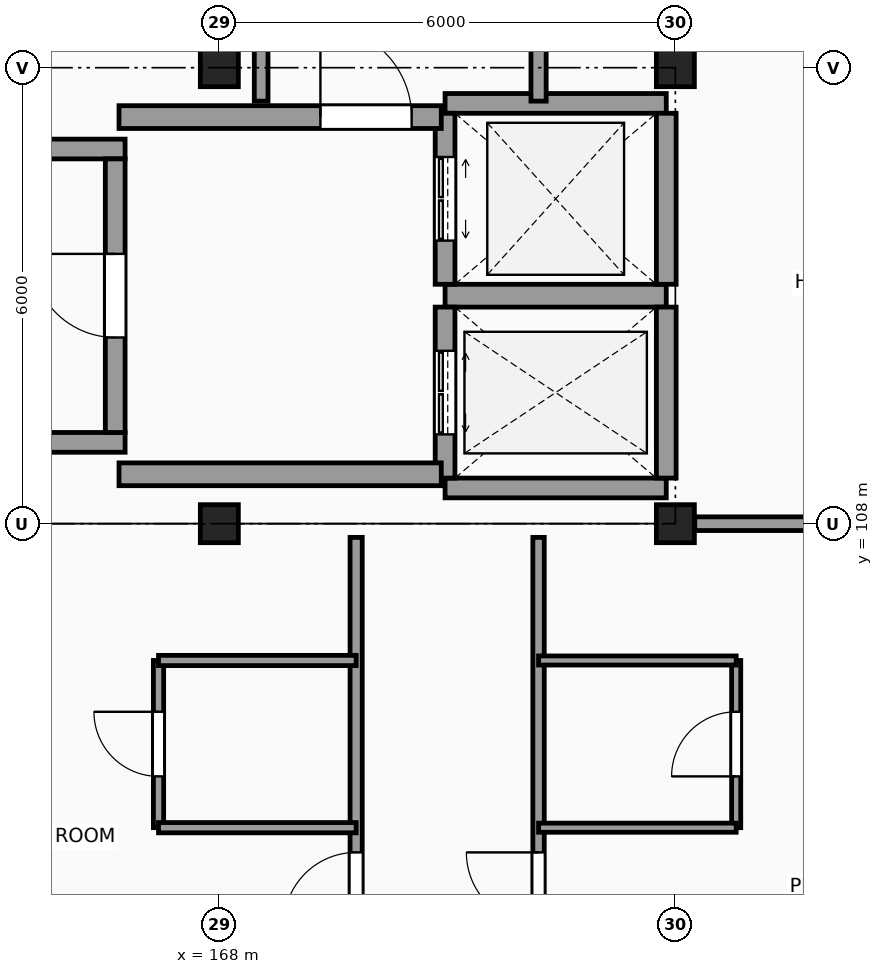
"""IFC4 building model, lengths in metres.
Left out: names, types, materials, properties, quantities, classifications, styles, units other than length and angle.
Written with IfcOpenShell. Run it as: python <this file> out.ifc"""

import sys

from ifc_helpers import new_model, si_unit, direction, frame, frame_2d, origin, origin_2d, place, context, subcontext, project, spatial, rectangle, extrude, element, fill, save


model = new_model("IFC4")
c1 = context("Model", 3, precision=1e-05, world=origin(), true_north=direction((0.0, 1.0)))
c2 = subcontext(c1, "Body", "Model", "MODEL_VIEW")
j1 = project(units=[si_unit("LENGTHUNIT", "METRE"), si_unit("PLANEANGLEUNIT", "RADIAN")], contexts=[c1])
p1 = place(None, origin())
s1 = spatial("IfcSite", under=j1, at=p1, CompositionType="ELEMENT")
p2 = place(p1, origin())
s2 = spatial("IfcBuilding", under=s1, at=p2, CompositionType="ELEMENT")
p3 = place(p2, frame((0.0, 0.0, 38.1)))
s3 = spatial("IfcBuildingStorey", under=s2, at=p3, CompositionType="ELEMENT", Elevation=38.1)
for number, where, z_axis, x_axis in (
    (1, (168.0, 108.0, 0.0), (0.0, 0.0, 1.0), (1.0, 0.0, 0.0)),
    (2, (168.0, 114.0, 0.0), (0.0, 0.0, 1.0), (1.0, 0.0, 0.0)),
    (3, (174.0, 108.0, 0.0), (0.0, 0.0, 1.0), (1.0, 0.0, 0.0)),
    (4, (174.0, 114.0, 0.0), (0.0, 0.0, 1.0), (1.0, 0.0, 0.0)),
):
    element("IfcColumn", number, at=place(p3, frame(where, z_axis=z_axis, x_axis=x_axis)), inside=s3, PredefinedType="COLUMN", context=c2, shape_type="SweptSolid", body=[
        extrude(rectangle(XDim=0.5, YDim=0.5, at=origin_2d()), origin(), (0.0, 0.0, 1.0), 3.3),
    ])
for number, where, z_axis, x_axis in (
    (5, (156.04, 109.07, 0.0), (0.0, 0.0, 1.0), (1.0, 0.0, 0.0)),
    (6, (156.04, 112.93, 0.0), (0.0, 0.0, 1.0), (1.0, 0.0, 0.0)),
):
    element("IfcWall", number, at=place(p3, frame(where, z_axis=z_axis, x_axis=x_axis)), inside=s3, PredefinedType="SHEAR", context=c2, shape_type="SweptSolid", body=[
        extrude(rectangle(XDim=10.72, YDim=0.26, at=frame_2d((5.36, 0.0))), origin(), (0.0, 0.0, 1.0), 3.3),
    ])
p4 = place(p3, frame((166.63, 109.2, 0.0), z_axis=(0.0, 0.0, 1.0), x_axis=(0.0, 1.0, 0.0)))
e7 = element("IfcWall", 7, at=p4, inside=s3, PredefinedType="SHEAR", context=c2, shape_type="SweptSolid", body=[
    extrude(rectangle(XDim=3.6, YDim=0.26, at=frame_2d((1.8, 0.0))), origin(), (0.0, 0.0, 1.0), 3.3),
])
p5 = place(p4, frame((1.25, 0.0, 0.0)))
e8 = element("IfcOpeningElement", 8, at=p5, cuts=e7, PredefinedType="OPENING", context=c2, shape_type="SweptSolid", body=[
    extrude(rectangle(XDim=1.1, YDim=2.15, at=frame_2d((0.55, 1.075))), frame((0.0, 0.14, 0.0), z_axis=(0.0, -1.0, 0.0), x_axis=(1.0, 0.0, 0.0)), (0.0, 0.0, 1.0), 0.28),
])
p6 = place(p3, frame((170.97, 108.47, 0.0), z_axis=(0.0, 0.0, 1.0), x_axis=(1.0, 0.0, 0.0)))
e9 = element("IfcWall", 9, at=p6, inside=s3, PredefinedType="SHEAR", context=c2, shape_type="SweptSolid", body=[
    extrude(rectangle(XDim=2.91, YDim=0.26, at=frame_2d((1.455, 0.0))), origin(), (0.0, 0.0, 1.0), 3.3),
])
p7 = place(p3, frame((170.97, 111.0, 0.0), z_axis=(0.0, 0.0, 1.0), x_axis=(1.0, 0.0, 0.0)))
e10 = element("IfcWall", 10, at=p7, inside=s3, PredefinedType="SHEAR", context=c2, shape_type="SweptSolid", body=[
    extrude(rectangle(XDim=2.91, YDim=0.3, at=frame_2d((1.455, 0.0))), origin(), (0.0, 0.0, 1.0), 3.3),
])
p8 = place(p3, frame((173.88, 108.6, 0.0), z_axis=(0.0, 0.0, 1.0), x_axis=(0.0, 1.0, 0.0)))
e11 = element("IfcWall", 11, at=p8, inside=s3, PredefinedType="SHEAR", context=c2, shape_type="SweptSolid", body=[
    extrude(rectangle(XDim=2.25, YDim=0.26, at=frame_2d((1.125, 0.0))), origin(), (0.0, 0.0, 1.0), 3.3),
])
p9 = place(p3, frame((170.97, 108.6, 0.0), z_axis=(0.0, 0.0, 1.0), x_axis=(0.0, 1.0, 0.0)))
e12 = element("IfcWall", 12, at=p9, inside=s3, PredefinedType="SHEAR", context=c2, shape_type="SweptSolid", body=[
    extrude(rectangle(XDim=2.25, YDim=0.26, at=frame_2d((1.125, 0.0))), origin(), (0.0, 0.0, 1.0), 3.3),
])
p10 = place(p9, frame((0.575, 0.0, 0.0)))
e13 = element("IfcOpeningElement", 13, at=p10, cuts=e12, PredefinedType="OPENING", context=c2, shape_type="SweptSolid", body=[
    extrude(rectangle(XDim=1.1, YDim=2.2, at=frame_2d((0.55, 1.1))), frame((0.0, 0.14, 0.0), z_axis=(0.0, -1.0, 0.0), x_axis=(1.0, 0.0, 0.0)), (0.0, 0.0, 1.0), 0.28),
])
p11 = place(p3, frame((170.97, 113.53, 0.0), z_axis=(0.0, 0.0, 1.0), x_axis=(1.0, 0.0, 0.0)))
e14 = element("IfcWall", 14, at=p11, inside=s3, PredefinedType="SHEAR", context=c2, shape_type="SweptSolid", body=[
    extrude(rectangle(XDim=2.91, YDim=0.26, at=frame_2d((1.455, 0.0))), origin(), (0.0, 0.0, 1.0), 3.3),
])
p12 = place(p3, frame((173.88, 111.15, 0.0), z_axis=(0.0, 0.0, 1.0), x_axis=(0.0, 1.0, 0.0)))
e15 = element("IfcWall", 15, at=p12, inside=s3, PredefinedType="SHEAR", context=c2, shape_type="SweptSolid", body=[
    extrude(rectangle(XDim=2.25, YDim=0.26, at=frame_2d((1.125, 0.0))), origin(), (0.0, 0.0, 1.0), 3.3),
])
p13 = place(p3, frame((170.97, 111.15, 0.0), z_axis=(0.0, 0.0, 1.0), x_axis=(0.0, 1.0, 0.0)))
e16 = element("IfcWall", 16, at=p13, inside=s3, PredefinedType="SHEAR", context=c2, shape_type="SweptSolid", body=[
    extrude(rectangle(XDim=2.25, YDim=0.26, at=frame_2d((1.125, 0.0))), origin(), (0.0, 0.0, 1.0), 3.3),
])
p14 = place(p13, frame((0.575, 0.0, 0.0)))
e17 = element("IfcOpeningElement", 17, at=p14, cuts=e16, PredefinedType="OPENING", context=c2, shape_type="SweptSolid", body=[
    extrude(rectangle(XDim=1.1, YDim=2.2, at=frame_2d((0.55, 1.1))), frame((0.0, 0.14, 0.0), z_axis=(0.0, -1.0, 0.0), x_axis=(1.0, 0.0, 0.0)), (0.0, 0.0, 1.0), 0.28),
])
p15 = place(p3, frame((166.68, 113.35, 0.0), z_axis=(0.0, 0.0, 1.0), x_axis=(1.0, 0.0, 0.0)))
e18 = element("IfcWall", 18, at=p15, inside=s3, PredefinedType="SHEAR", context=c2, shape_type="SweptSolid", body=[
    extrude(rectangle(XDim=4.24, YDim=0.3, at=frame_2d((2.12, 0.0))), origin(), (0.0, 0.0, 1.0), 3.3),
])
p16 = place(p15, frame((2.65, 0.0, 0.0)))
e19 = element("IfcOpeningElement", 19, at=p16, cuts=e18, PredefinedType="OPENING", context=c2, shape_type="SweptSolid", body=[
    extrude(rectangle(XDim=1.2, YDim=2.2, at=frame_2d((0.6, 1.1))), frame((0.0, 0.16, 0.0), z_axis=(0.0, -1.0, 0.0), x_axis=(1.0, 0.0, 0.0)), (0.0, 0.0, 1.0), 0.32),
])
p17 = place(p3, frame((166.68, 108.65, 0.0), z_axis=(0.0, 0.0, 1.0), x_axis=(1.0, 0.0, 0.0)))
e20 = element("IfcWall", 20, at=p17, inside=s3, PredefinedType="SHEAR", context=c2, shape_type="SweptSolid", body=[
    extrude(rectangle(XDim=4.24, YDim=0.3, at=frame_2d((2.12, 0.0))), origin(), (0.0, 0.0, 1.0), 3.3),
])
p18 = place(p3, frame((167.2, 104.0, 0.0), z_axis=(0.0, 0.0, 1.0), x_axis=(0.0, 1.0, 0.0)))
e21 = element("IfcWall", 21, at=p18, inside=s3, PredefinedType="PARTITIONING", context=c2, shape_type="SweptSolid", body=[
    extrude(rectangle(XDim=2.2, YDim=0.135, at=frame_2d((1.1, 0.0))), origin(), (0.0, 0.0, 1.0), 3.06),
])
p19 = place(p18, frame((0.675, 0.0, 0.0)))
e22 = element("IfcOpeningElement", 22, at=p19, cuts=e21, PredefinedType="OPENING", context=c2, shape_type="SweptSolid", body=[
    extrude(rectangle(XDim=0.85, YDim=2.1, at=frame_2d((0.425, 1.05))), frame((0.0, 0.078, 0.0), z_axis=(0.0, -1.0, 0.0), x_axis=(1.0, 0.0, 0.0)), (0.0, 0.0, 1.0), 0.155),
])
p20 = place(p3, frame((168.55, 113.56, 0.0), z_axis=(0.0, 0.0, 1.0), x_axis=(0.0, 1.0, 0.0)))
e23 = element("IfcWall", 23, at=p20, inside=s3, PredefinedType="PARTITIONING", context=c2, shape_type="SweptSolid", body=[
    extrude(rectangle(XDim=2.24, YDim=0.18, at=frame_2d((1.12, 0.0))), origin(), (0.0, 0.0, 1.0), 3.06),
])
p21 = place(p3, frame((169.8, 42.215, 0.0), z_axis=(0.0, 0.0, 1.0), x_axis=(0.0, 1.0, 0.0)))
e24 = element("IfcWall", 24, at=p21, inside=s3, PredefinedType="PARTITIONING", context=c2, shape_type="SweptSolid", body=[
    extrude(rectangle(XDim=65.605, YDim=0.16, at=frame_2d((32.802, 0.0))), origin(), (0.0, 0.0, 1.0), 3.06),
])
p22 = place(p21, frame((50.185, 0.0, 0.0)))
e25 = element("IfcOpeningElement", 25, at=p22, cuts=e24, PredefinedType="OPENING", context=c2, shape_type="SweptSolid", body=[
    extrude(rectangle(XDim=1.2, YDim=2.2, at=frame_2d((0.6, 1.1))), frame((0.0, 0.09, 0.0), z_axis=(0.0, -1.0, 0.0), x_axis=(1.0, 0.0, 0.0)), (0.0, 0.0, 1.0), 0.18),
])
p23 = place(p21, frame((32.285, 0.0, 0.0)))
e26 = element("IfcOpeningElement", 26, at=p23, cuts=e24, PredefinedType="OPENING", context=c2, shape_type="SweptSolid", body=[
    extrude(rectangle(XDim=1.0, YDim=2.15, at=frame_2d((0.5, 1.075))), frame((0.0, 0.09, 0.0), z_axis=(0.0, -1.0, 0.0), x_axis=(1.0, 0.0, 0.0)), (0.0, 0.0, 1.0), 0.18),
])
p24 = place(p21, frame((0.46, 0.0, 0.0)))
e27 = element("IfcOpeningElement", 27, at=p24, cuts=e24, PredefinedType="OPENING", context=c2, shape_type="SweptSolid", body=[
    extrude(rectangle(XDim=0.95, YDim=2.1, at=frame_2d((0.475, 1.05))), frame((0.0, 0.09, 0.0), z_axis=(0.0, -1.0, 0.0), x_axis=(1.0, 0.0, 0.0)), (0.0, 0.0, 1.0), 0.18),
])
p25 = place(p21, frame((6.51, 0.0, 0.0)))
e28 = element("IfcOpeningElement", 28, at=p25, cuts=e24, PredefinedType="OPENING", context=c2, shape_type="SweptSolid", body=[
    extrude(rectangle(XDim=0.95, YDim=2.1, at=frame_2d((0.475, 1.05))), frame((0.0, 0.09, 0.0), z_axis=(0.0, -1.0, 0.0), x_axis=(1.0, 0.0, 0.0)), (0.0, 0.0, 1.0), 0.18),
])
p26 = place(p21, frame((12.51, 0.0, 0.0)))
e29 = element("IfcOpeningElement", 29, at=p26, cuts=e24, PredefinedType="OPENING", context=c2, shape_type="SweptSolid", body=[
    extrude(rectangle(XDim=0.95, YDim=2.1, at=frame_2d((0.475, 1.05))), frame((0.0, 0.09, 0.0), z_axis=(0.0, -1.0, 0.0), x_axis=(1.0, 0.0, 0.0)), (0.0, 0.0, 1.0), 0.18),
])
p27 = place(p21, frame((18.51, 0.0, 0.0)))
e30 = element("IfcOpeningElement", 30, at=p27, cuts=e24, PredefinedType="OPENING", context=c2, shape_type="SweptSolid", body=[
    extrude(rectangle(XDim=0.95, YDim=2.1, at=frame_2d((0.475, 1.05))), frame((0.0, 0.09, 0.0), z_axis=(0.0, -1.0, 0.0), x_axis=(1.0, 0.0, 0.0)), (0.0, 0.0, 1.0), 0.18),
])
p28 = place(p21, frame((24.51, 0.0, 0.0)))
e31 = element("IfcOpeningElement", 31, at=p28, cuts=e24, PredefinedType="OPENING", context=c2, shape_type="SweptSolid", body=[
    extrude(rectangle(XDim=0.95, YDim=2.1, at=frame_2d((0.475, 1.05))), frame((0.0, 0.09, 0.0), z_axis=(0.0, -1.0, 0.0), x_axis=(1.0, 0.0, 0.0)), (0.0, 0.0, 1.0), 0.18),
])
p29 = place(p21, frame((54.51, 0.0, 0.0)))
e32 = element("IfcOpeningElement", 32, at=p29, cuts=e24, PredefinedType="OPENING", context=c2, shape_type="SweptSolid", body=[
    extrude(rectangle(XDim=0.95, YDim=2.1, at=frame_2d((0.475, 1.05))), frame((0.0, 0.09, 0.0), z_axis=(0.0, -1.0, 0.0), x_axis=(1.0, 0.0, 0.0)), (0.0, 0.0, 1.0), 0.18),
])
p30 = place(p21, frame((60.51, 0.0, 0.0)))
e33 = element("IfcOpeningElement", 33, at=p30, cuts=e24, PredefinedType="OPENING", context=c2, shape_type="SweptSolid", body=[
    extrude(rectangle(XDim=0.95, YDim=2.1, at=frame_2d((0.475, 1.05))), frame((0.0, 0.09, 0.0), z_axis=(0.0, -1.0, 0.0), x_axis=(1.0, 0.0, 0.0)), (0.0, 0.0, 1.0), 0.18),
])
p31 = place(p3, frame((172.2, 42.215, 0.0), z_axis=(0.0, 0.0, 1.0), x_axis=(0.0, 1.0, 0.0)))
e34 = element("IfcWall", 34, at=p31, inside=s3, PredefinedType="PARTITIONING", context=c2, shape_type="SweptSolid", body=[
    extrude(rectangle(XDim=65.605, YDim=0.15, at=frame_2d((32.802, 0.0))), origin(), (0.0, 0.0, 1.0), 3.06),
])
p32 = place(p31, frame((0.46, 0.0, 0.0)))
e35 = element("IfcOpeningElement", 35, at=p32, cuts=e34, PredefinedType="OPENING", context=c2, shape_type="SweptSolid", body=[
    extrude(rectangle(XDim=0.95, YDim=2.1, at=frame_2d((0.475, 1.05))), frame((0.0, 0.085, 0.0), z_axis=(0.0, -1.0, 0.0), x_axis=(1.0, 0.0, 0.0)), (0.0, 0.0, 1.0), 0.17),
])
p33 = place(p31, frame((4.91, 0.0, 0.0)))
e36 = element("IfcOpeningElement", 36, at=p33, cuts=e34, PredefinedType="OPENING", context=c2, shape_type="SweptSolid", body=[
    extrude(rectangle(XDim=0.95, YDim=2.1, at=frame_2d((0.475, 1.05))), frame((0.0, 0.085, 0.0), z_axis=(0.0, -1.0, 0.0), x_axis=(1.0, 0.0, 0.0)), (0.0, 0.0, 1.0), 0.17),
])
p34 = place(p31, frame((12.11, 0.0, 0.0)))
e37 = element("IfcOpeningElement", 37, at=p34, cuts=e34, PredefinedType="OPENING", context=c2, shape_type="SweptSolid", body=[
    extrude(rectangle(XDim=0.95, YDim=2.1, at=frame_2d((0.475, 1.05))), frame((0.0, 0.085, 0.0), z_axis=(0.0, -1.0, 0.0), x_axis=(1.0, 0.0, 0.0)), (0.0, 0.0, 1.0), 0.17),
])
p35 = place(p31, frame((20.36, 0.0, 0.0)))
e38 = element("IfcOpeningElement", 38, at=p35, cuts=e34, PredefinedType="OPENING", context=c2, shape_type="SweptSolid", body=[
    extrude(rectangle(XDim=0.95, YDim=2.1, at=frame_2d((0.475, 1.05))), frame((0.0, 0.085, 0.0), z_axis=(0.0, -1.0, 0.0), x_axis=(1.0, 0.0, 0.0)), (0.0, 0.0, 1.0), 0.17),
])
p36 = place(p31, frame((22.91, 0.0, 0.0)))
e39 = element("IfcOpeningElement", 39, at=p36, cuts=e34, PredefinedType="OPENING", context=c2, shape_type="SweptSolid", body=[
    extrude(rectangle(XDim=0.95, YDim=2.1, at=frame_2d((0.475, 1.05))), frame((0.0, 0.085, 0.0), z_axis=(0.0, -1.0, 0.0), x_axis=(1.0, 0.0, 0.0)), (0.0, 0.0, 1.0), 0.17),
])
p37 = place(p31, frame((30.11, 0.0, 0.0)))
e40 = element("IfcOpeningElement", 40, at=p37, cuts=e34, PredefinedType="OPENING", context=c2, shape_type="SweptSolid", body=[
    extrude(rectangle(XDim=0.95, YDim=2.1, at=frame_2d((0.475, 1.05))), frame((0.0, 0.085, 0.0), z_axis=(0.0, -1.0, 0.0), x_axis=(1.0, 0.0, 0.0)), (0.0, 0.0, 1.0), 0.17),
])
p38 = place(p31, frame((34.31, 0.0, 0.0)))
e41 = element("IfcOpeningElement", 41, at=p38, cuts=e34, PredefinedType="OPENING", context=c2, shape_type="SweptSolid", body=[
    extrude(rectangle(XDim=0.95, YDim=2.1, at=frame_2d((0.475, 1.05))), frame((0.0, 0.085, 0.0), z_axis=(0.0, -1.0, 0.0), x_axis=(1.0, 0.0, 0.0)), (0.0, 0.0, 1.0), 0.17),
])
p39 = place(p31, frame((43.61, 0.0, 0.0)))
e42 = element("IfcOpeningElement", 42, at=p39, cuts=e34, PredefinedType="OPENING", context=c2, shape_type="SweptSolid", body=[
    extrude(rectangle(XDim=0.95, YDim=2.1, at=frame_2d((0.475, 1.05))), frame((0.0, 0.085, 0.0), z_axis=(0.0, -1.0, 0.0), x_axis=(1.0, 0.0, 0.0)), (0.0, 0.0, 1.0), 0.17),
])
p40 = place(p31, frame((48.11, 0.0, 0.0)))
e43 = element("IfcOpeningElement", 43, at=p40, cuts=e34, PredefinedType="OPENING", context=c2, shape_type="SweptSolid", body=[
    extrude(rectangle(XDim=0.95, YDim=2.1, at=frame_2d((0.475, 1.05))), frame((0.0, 0.085, 0.0), z_axis=(0.0, -1.0, 0.0), x_axis=(1.0, 0.0, 0.0)), (0.0, 0.0, 1.0), 0.17),
])
p41 = place(p31, frame((52.31, 0.0, 0.0)))
e44 = element("IfcOpeningElement", 44, at=p41, cuts=e34, PredefinedType="OPENING", context=c2, shape_type="SweptSolid", body=[
    extrude(rectangle(XDim=0.95, YDim=2.1, at=frame_2d((0.475, 1.05))), frame((0.0, 0.085, 0.0), z_axis=(0.0, -1.0, 0.0), x_axis=(1.0, 0.0, 0.0)), (0.0, 0.0, 1.0), 0.17),
])
p42 = place(p31, frame((54.51, 0.0, 0.0)))
e45 = element("IfcOpeningElement", 45, at=p42, cuts=e34, PredefinedType="OPENING", context=c2, shape_type="SweptSolid", body=[
    extrude(rectangle(XDim=0.95, YDim=2.1, at=frame_2d((0.475, 1.05))), frame((0.0, 0.085, 0.0), z_axis=(0.0, -1.0, 0.0), x_axis=(1.0, 0.0, 0.0)), (0.0, 0.0, 1.0), 0.17),
])
p43 = place(p31, frame((60.51, 0.0, 0.0)))
e46 = element("IfcOpeningElement", 46, at=p43, cuts=e34, PredefinedType="OPENING", context=c2, shape_type="SweptSolid", body=[
    extrude(rectangle(XDim=0.95, YDim=2.1, at=frame_2d((0.475, 1.05))), frame((0.0, 0.085, 0.0), z_axis=(0.0, -1.0, 0.0), x_axis=(1.0, 0.0, 0.0)), (0.0, 0.0, 1.0), 0.17),
])
p44 = place(p3, frame((172.2, 113.56, 0.0), z_axis=(0.0, 0.0, 1.0), x_axis=(0.0, 1.0, 0.0)))
e47 = element("IfcWall", 47, at=p44, inside=s3, PredefinedType="PARTITIONING", context=c2, shape_type="SweptSolid", body=[
    extrude(rectangle(XDim=2.24, YDim=0.2, at=frame_2d((1.12, 0.0))), origin(), (0.0, 0.0, 1.0), 3.06),
])
p45 = place(p3, frame((174.8, 104.0, 0.0), z_axis=(0.0, 0.0, 1.0), x_axis=(0.0, 1.0, 0.0)))
e48 = element("IfcWall", 48, at=p45, inside=s3, PredefinedType="PARTITIONING", context=c2, shape_type="SweptSolid", body=[
    extrude(rectangle(XDim=2.2, YDim=0.12, at=frame_2d((1.1, 0.0))), origin(), (0.0, 0.0, 1.0), 3.06),
])
p46 = place(p45, frame((0.675, 0.0, 0.0)))
e49 = element("IfcOpeningElement", 49, at=p46, cuts=e48, PredefinedType="OPENING", context=c2, shape_type="SweptSolid", body=[
    extrude(rectangle(XDim=0.85, YDim=2.1, at=frame_2d((0.425, 1.05))), frame((0.0, 0.07, 0.0), z_axis=(0.0, -1.0, 0.0), x_axis=(1.0, 0.0, 0.0)), (0.0, 0.0, 1.0), 0.14),
])
p47 = place(p3, frame((167.2, 104.0, 0.0), z_axis=(0.0, 0.0, 1.0), x_axis=(1.0, 0.0, 0.0)))
e50 = element("IfcWall", 50, at=p47, inside=s3, PredefinedType="PARTITIONING", context=c2, shape_type="SweptSolid", body=[
    extrude(rectangle(XDim=2.6, YDim=0.135, at=frame_2d((1.3, 0.0))), origin(), (0.0, 0.0, 1.0), 3.06),
])
p48 = place(p3, frame((172.2, 104.0, 0.0), z_axis=(0.0, 0.0, 1.0), x_axis=(1.0, 0.0, 0.0)))
e51 = element("IfcWall", 51, at=p48, inside=s3, PredefinedType="PARTITIONING", context=c2, shape_type="SweptSolid", body=[
    extrude(rectangle(XDim=2.6, YDim=0.12, at=frame_2d((1.3, 0.0))), origin(), (0.0, 0.0, 1.0), 3.06),
])
p49 = place(p3, frame((167.2, 106.2, 0.0), z_axis=(0.0, 0.0, 1.0), x_axis=(1.0, 0.0, 0.0)))
e52 = element("IfcWall", 52, at=p49, inside=s3, PredefinedType="PARTITIONING", context=c2, shape_type="SweptSolid", body=[
    extrude(rectangle(XDim=2.6, YDim=0.135, at=frame_2d((1.3, 0.0))), origin(), (0.0, 0.0, 1.0), 3.06),
])
p50 = place(p3, frame((172.2, 106.2, 0.0), z_axis=(0.0, 0.0, 1.0), x_axis=(1.0, 0.0, 0.0)))
e53 = element("IfcWall", 53, at=p50, inside=s3, PredefinedType="PARTITIONING", context=c2, shape_type="SweptSolid", body=[
    extrude(rectangle(XDim=2.6, YDim=0.12, at=frame_2d((1.3, 0.0))), origin(), (0.0, 0.0, 1.0), 3.06),
])
p51 = place(p3, frame((174.255, 108.0, 0.0), z_axis=(0.0, 0.0, 1.0), x_axis=(1.0, 0.0, 0.0)))
e54 = element("IfcWall", 54, at=p51, inside=s3, PredefinedType="PARTITIONING", context=c2, shape_type="SweptSolid", body=[
    extrude(rectangle(XDim=5.465, YDim=0.18, at=frame_2d((2.732, 0.0))), origin(), (0.0, 0.0, 1.0), 2.77),
])
p52 = place(p5, origin())
e55 = element("IfcDoor", 55, at=p52, inside=s3, OperationType="SINGLE_SWING_RIGHT", PredefinedType="DOOR", context=c2, shape_type="SweptSolid", body=[
    extrude(rectangle(XDim=1.1, YDim=2.15, at=frame_2d((0.55, 1.075))), frame((0.0, 0.025, 0.0), z_axis=(0.0, -1.0, 0.0), x_axis=(1.0, 0.0, 0.0)), (0.0, 0.0, 1.0), 0.05),
])
fill(e8, e55)
p53 = place(p10, origin())
e56 = element("IfcDoor", 56, at=p53, inside=s3, OperationType="DOUBLE_DOOR_SLIDING", PredefinedType="DOOR", context=c2, shape_type="SweptSolid", body=[
    extrude(rectangle(XDim=1.1, YDim=2.2, at=frame_2d((0.55, 1.1))), frame((0.0, 0.025, 0.0), z_axis=(0.0, -1.0, 0.0), x_axis=(1.0, 0.0, 0.0)), (0.0, 0.0, 1.0), 0.05),
])
fill(e13, e56)
p54 = place(p14, origin())
e57 = element("IfcDoor", 57, at=p54, inside=s3, OperationType="DOUBLE_DOOR_SLIDING", PredefinedType="DOOR", context=c2, shape_type="SweptSolid", body=[
    extrude(rectangle(XDim=1.1, YDim=2.2, at=frame_2d((0.55, 1.1))), frame((0.0, 0.025, 0.0), z_axis=(0.0, -1.0, 0.0), x_axis=(1.0, 0.0, 0.0)), (0.0, 0.0, 1.0), 0.05),
])
fill(e17, e57)
p55 = place(p16, origin())
e58 = element("IfcDoor", 58, at=p55, inside=s3, OperationType="SINGLE_SWING_LEFT", PredefinedType="DOOR", context=c2, shape_type="SweptSolid", body=[
    extrude(rectangle(XDim=1.2, YDim=2.2, at=frame_2d((0.6, 1.1))), frame((0.0, 0.025, 0.0), z_axis=(0.0, -1.0, 0.0), x_axis=(1.0, 0.0, 0.0)), (0.0, 0.0, 1.0), 0.05),
])
fill(e19, e58)
p56 = place(p46, origin())
e59 = element("IfcDoor", 59, at=p56, inside=s3, OperationType="SINGLE_SWING_LEFT", PredefinedType="DOOR", context=c2, shape_type="SweptSolid", body=[
    extrude(rectangle(XDim=0.85, YDim=2.1, at=frame_2d((0.425, 1.05))), frame((0.0, 0.025, 0.0), z_axis=(0.0, -1.0, 0.0), x_axis=(1.0, 0.0, 0.0)), (0.0, 0.0, 1.0), 0.05),
])
fill(e49, e59)
p57 = place(p43, origin())
e60 = element("IfcDoor", 60, at=p57, inside=s3, OperationType="SINGLE_SWING_RIGHT", PredefinedType="DOOR", context=c2, shape_type="SweptSolid", body=[
    extrude(rectangle(XDim=0.95, YDim=2.1, at=frame_2d((0.475, 1.05))), frame((0.0, 0.025, 0.0), z_axis=(0.0, -1.0, 0.0), x_axis=(1.0, 0.0, 0.0)), (0.0, 0.0, 1.0), 0.05),
])
fill(e46, e60)
p58 = place(p19, origin())
e61 = element("IfcDoor", 61, at=p58, inside=s3, OperationType="SINGLE_SWING_RIGHT", PredefinedType="DOOR", context=c2, shape_type="SweptSolid", body=[
    extrude(rectangle(XDim=0.85, YDim=2.1, at=frame_2d((0.425, 1.05))), frame((0.0, 0.025, 0.0), z_axis=(0.0, -1.0, 0.0), x_axis=(1.0, 0.0, 0.0)), (0.0, 0.0, 1.0), 0.05),
])
fill(e22, e61)
p59 = place(p30, origin())
e62 = element("IfcDoor", 62, at=p59, inside=s3, OperationType="SINGLE_SWING_LEFT", PredefinedType="DOOR", context=c2, shape_type="SweptSolid", body=[
    extrude(rectangle(XDim=0.95, YDim=2.1, at=frame_2d((0.475, 1.05))), frame((0.0, 0.025, 0.0), z_axis=(0.0, -1.0, 0.0), x_axis=(1.0, 0.0, 0.0)), (0.0, 0.0, 1.0), 0.05),
])
fill(e33, e62)
save(model, sys.argv[1])
